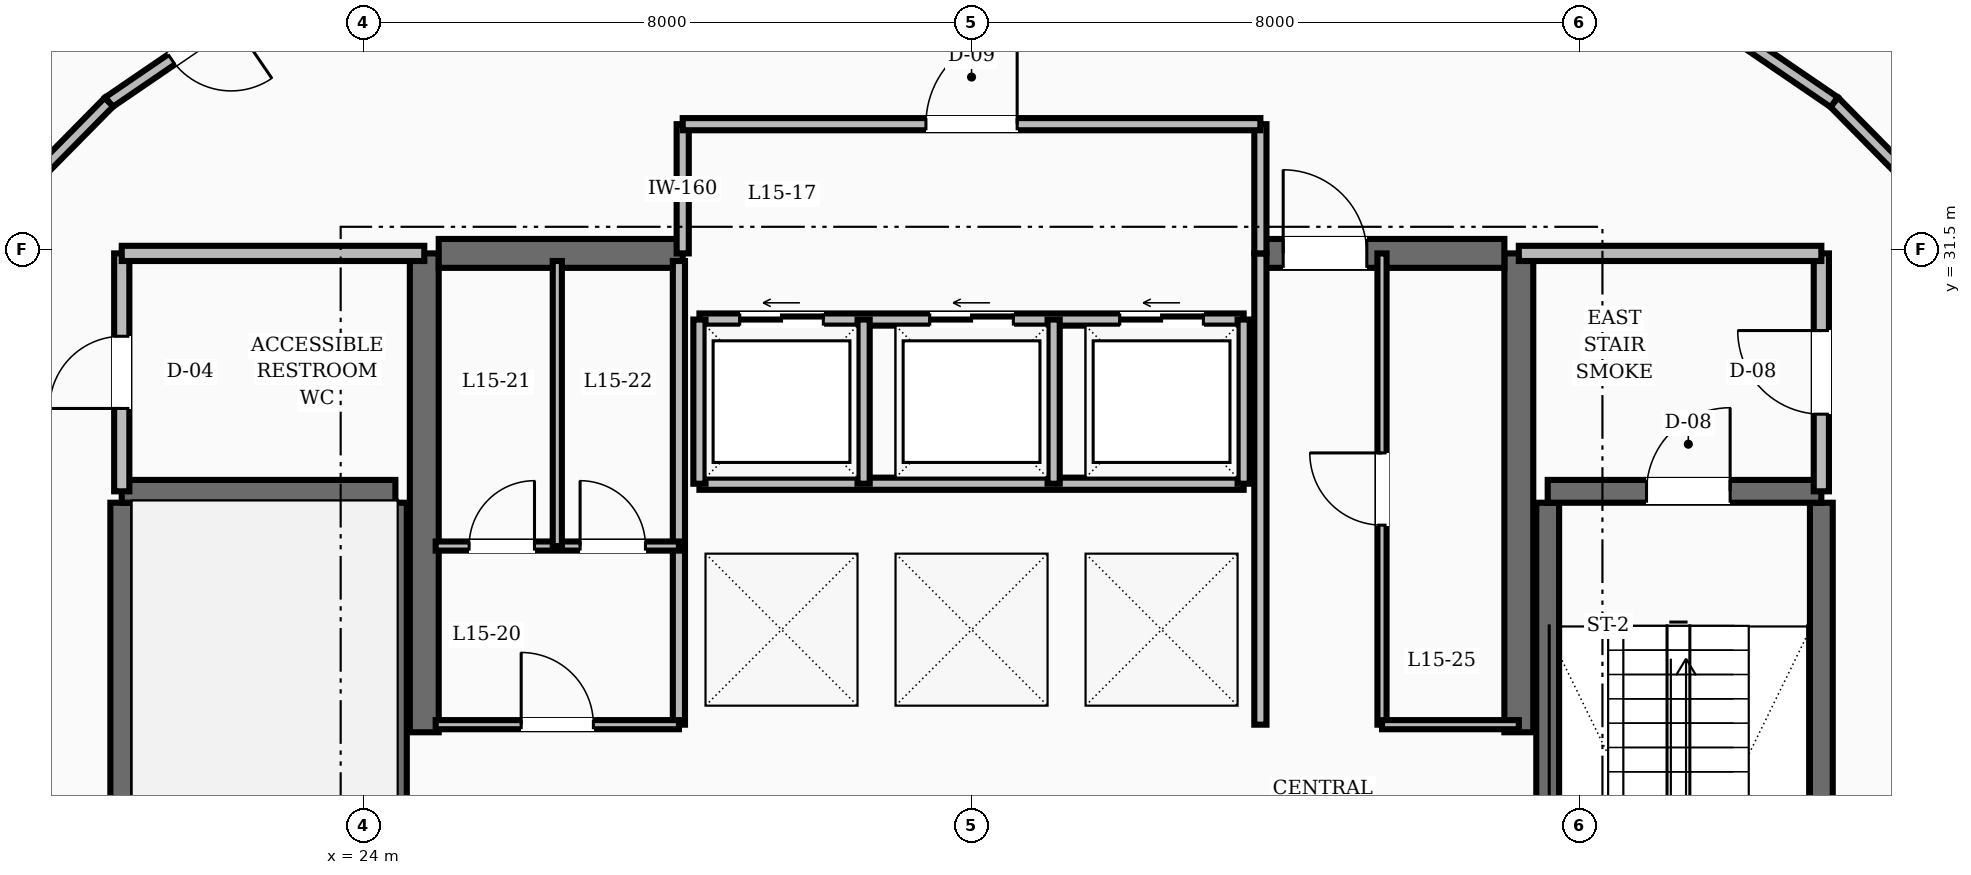
"""IFC4 building model, lengths in metres.
Left out: names, types, materials, properties, quantities, classifications, styles, units other than length and angle.
Written with IfcOpenShell. Run it as: python <this file> out.ifc"""

import sys

from ifc_helpers import new_model, si_unit, direction, frame, frame_2d, origin, place, context, subcontext, project, spatial, rectangle, extrude, element, fill, save


model = new_model("IFC4")
c1 = context("Model", 3, precision=1e-05, world=origin(), true_north=direction((0.0, 1.0)))
c2 = subcontext(c1, "Body", "Model", "MODEL_VIEW")
j1 = project(units=[si_unit("LENGTHUNIT", "METRE"), si_unit("PLANEANGLEUNIT", "RADIAN")], contexts=[c1])
p1 = place(None, origin())
s1 = spatial("IfcSite", under=j1, at=p1, CompositionType="ELEMENT")
p2 = place(p1, origin())
s2 = spatial("IfcBuilding", under=s1, at=p2, CompositionType="ELEMENT")
p3 = place(p2, frame((0.0, 0.0, 62.8)))
s3 = spatial("IfcBuildingStorey", under=s2, at=p3, CompositionType="ELEMENT", Elevation=62.8)
for number, where, z_axis, x_axis in (
    (1, (24.8, 25.15, 0.0), (0.0, 0.0, 1.0), (0.0, 1.0, 0.0)),
    (2, (39.2, 25.15, 0.0), (0.0, 0.0, 1.0), (0.0, 1.0, 0.0)),
):
    element("IfcWall", number, at=place(p3, frame(where, z_axis=z_axis, x_axis=x_axis)), inside=s3, PredefinedType="SHEAR", context=c2, shape_type="SweptSolid", body=[
        extrude(rectangle(XDim=6.3, YDim=0.38, at=frame_2d((3.15, 0.0))), origin(), (0.0, 0.0, 1.0), 3.6),
    ])
p4 = place(p3, frame((24.99, 31.45, 0.0), z_axis=(0.0, 0.0, 1.0), x_axis=(1.0, 0.0, 0.0)))
e3 = element("IfcWall", 3, at=p4, inside=s3, PredefinedType="SHEAR", context=c2, shape_type="SweptSolid", body=[
    extrude(rectangle(XDim=3.21, YDim=0.38, at=frame_2d((1.605, 0.0))), origin(), (0.0, 0.0, 1.0), 3.6),
])
p5 = place(p3, frame((35.8, 31.45, 0.0), z_axis=(0.0, 0.0, 1.0), x_axis=(1.0, 0.0, 0.0)))
e4 = element("IfcWall", 4, at=p5, inside=s3, PredefinedType="SHEAR", context=c2, shape_type="SweptSolid", body=[
    extrude(rectangle(XDim=3.21, YDim=0.38, at=frame_2d((1.605, 0.0))), origin(), (0.0, 0.0, 1.0), 3.6),
])
p6 = place(p5, frame((0.3, 0.0, 0.0)))
e5 = element("IfcOpeningElement", 5, at=p6, cuts=e4, PredefinedType="OPENING", context=c2, shape_type="SweptSolid", body=[
    extrude(rectangle(XDim=1.1, YDim=2.1, at=frame_2d((0.55, 1.05))), frame((0.0, 0.2, 0.0), z_axis=(0.0, -1.0, 0.0), x_axis=(1.0, 0.0, 0.0)), (0.0, 0.0, 1.0), 0.4),
])
for number, where, z_axis, x_axis in (
    (6, (20.82, 19.43, 0.0), (0.0, 0.0, 1.0), (0.0, 1.0, 0.0)),
    (7, (24.42, 19.43, 0.0), (0.0, 0.0, 1.0), (0.0, 1.0, 0.0)),
):
    element("IfcWall", number, at=place(p3, frame(where, z_axis=z_axis, x_axis=x_axis)), inside=s3, PredefinedType="SHEAR", context=c2, shape_type="SweptSolid", body=[
        extrude(rectangle(XDim=8.74, YDim=0.3, at=frame_2d((4.37, 0.0))), origin(), (0.0, 0.0, 1.0), 3.6),
    ])
p7 = place(p3, frame((20.82, 28.32, 0.0), z_axis=(0.0, 0.0, 1.0), x_axis=(1.0, 0.0, 0.0)))
e8 = element("IfcWall", 8, at=p7, inside=s3, PredefinedType="SHEAR", context=c2, shape_type="SweptSolid", body=[
    extrude(rectangle(XDim=3.6, YDim=0.3, at=frame_2d((1.8, 0.0))), origin(), (0.0, 0.0, 1.0), 3.6),
])
for number, where, z_axis, x_axis in (
    (9, (43.18, 19.43, 0.0), (0.0, 0.0, 1.0), (0.0, 1.0, 0.0)),
    (10, (39.58, 19.43, 0.0), (0.0, 0.0, 1.0), (0.0, 1.0, 0.0)),
):
    element("IfcWall", number, at=place(p3, frame(where, z_axis=z_axis, x_axis=x_axis)), inside=s3, PredefinedType="SHEAR", context=c2, shape_type="SweptSolid", body=[
        extrude(rectangle(XDim=8.74, YDim=0.3, at=frame_2d((4.37, 0.0))), origin(), (0.0, 0.0, 1.0), 3.6),
    ])
p8 = place(p3, frame((39.58, 28.32, 0.0), z_axis=(0.0, 0.0, 1.0), x_axis=(1.0, 0.0, 0.0)))
e11 = element("IfcWall", 11, at=p8, inside=s3, PredefinedType="SHEAR", context=c2, shape_type="SweptSolid", body=[
    extrude(rectangle(XDim=3.6, YDim=0.3, at=frame_2d((1.8, 0.0))), origin(), (0.0, 0.0, 1.0), 3.6),
])
p9 = place(p8, frame((1.3, 0.0, 0.0)))
e12 = element("IfcOpeningElement", 12, at=p9, cuts=e11, PredefinedType="OPENING", context=c2, shape_type="SweptSolid", body=[
    extrude(rectangle(XDim=1.1, YDim=2.1, at=frame_2d((0.55, 1.05))), frame((0.0, 0.16, 0.0), z_axis=(0.0, -1.0, 0.0), x_axis=(1.0, 0.0, 0.0)), (0.0, 0.0, 1.0), 0.32),
])
p10 = place(p3, frame((43.18, 28.32, 0.0), z_axis=(0.0, 0.0, 1.0), x_axis=(0.0, 1.0, 0.0)))
e13 = element("IfcWall", 13, at=p10, inside=s3, PredefinedType="SOLIDWALL", context=c2, shape_type="SweptSolid", body=[
    extrude(rectangle(XDim=3.13, YDim=0.2, at=frame_2d((1.565, 0.0))), origin(), (0.0, 0.0, 1.0), 2.71),
])
p11 = place(p10, frame((1.015, 0.0, 0.0)))
e14 = element("IfcOpeningElement", 14, at=p11, cuts=e13, PredefinedType="OPENING", context=c2, shape_type="SweptSolid", body=[
    extrude(rectangle(XDim=1.1, YDim=2.1, at=frame_2d((0.55, 1.05))), frame((0.0, 0.11, 0.0), z_axis=(0.0, -1.0, 0.0), x_axis=(1.0, 0.0, 0.0)), (0.0, 0.0, 1.0), 0.22),
])
p12 = place(p3, frame((39.2, 31.45, 0.0), z_axis=(0.0, 0.0, 1.0), x_axis=(1.0, 0.0, 0.0)))
e15 = element("IfcWall", 15, at=p12, inside=s3, PredefinedType="SOLIDWALL", context=c2, shape_type="SweptSolid", body=[
    extrude(rectangle(XDim=3.98, YDim=0.2, at=frame_2d((1.99, 0.0))), origin(), (0.0, 0.0, 1.0), 2.71),
])
p13 = place(p3, frame((20.82, 28.32, 0.0), z_axis=(0.0, 0.0, 1.0), x_axis=(0.0, 1.0, 0.0)))
e16 = element("IfcWall", 16, at=p13, inside=s3, PredefinedType="SOLIDWALL", context=c2, shape_type="SweptSolid", body=[
    extrude(rectangle(XDim=3.13, YDim=0.2, at=frame_2d((1.565, 0.0))), origin(), (0.0, 0.0, 1.0), 2.71),
])
p14 = place(p13, frame((1.09, 0.0, 0.0)))
e17 = element("IfcOpeningElement", 17, at=p14, cuts=e16, PredefinedType="OPENING", context=c2, shape_type="SweptSolid", body=[
    extrude(rectangle(XDim=0.95, YDim=2.1, at=frame_2d((0.475, 1.05))), frame((0.0, 0.11, 0.0), z_axis=(0.0, -1.0, 0.0), x_axis=(1.0, 0.0, 0.0)), (0.0, 0.0, 1.0), 0.22),
])
p15 = place(p3, frame((20.82, 31.45, 0.0), z_axis=(0.0, 0.0, 1.0), x_axis=(1.0, 0.0, 0.0)))
e18 = element("IfcWall", 18, at=p15, inside=s3, PredefinedType="SOLIDWALL", context=c2, shape_type="SweptSolid", body=[
    extrude(rectangle(XDim=3.98, YDim=0.2, at=frame_2d((1.99, 0.0))), origin(), (0.0, 0.0, 1.0), 2.71),
])
p16 = place(p3, frame((35.8, 25.25, 0.0), z_axis=(0.0, 0.0, 1.0), x_axis=(0.0, 1.0, 0.0)))
e19 = element("IfcWall", 19, at=p16, inside=s3, PredefinedType="SOLIDWALL", context=c2, shape_type="SweptSolid", body=[
    extrude(rectangle(XDim=6.2, YDim=0.16, at=frame_2d((3.1, 0.0))), origin(), (0.0, 0.0, 1.0), 2.71),
])
p17 = place(p3, frame((28.42, 30.58, 0.0), z_axis=(0.0, 0.0, 1.0), x_axis=(1.0, 0.0, 0.0)))
e20 = element("IfcWall", 20, at=p17, inside=s3, PredefinedType="SOLIDWALL", context=c2, shape_type="SweptSolid", body=[
    extrude(rectangle(XDim=7.16, YDim=0.16, at=frame_2d((3.58, 0.0))), origin(), (0.0, 0.0, 1.0), 2.71),
])
p18 = place(p17, frame((0.53, 0.0, 0.0)))
e21 = element("IfcOpeningElement", 21, at=p18, cuts=e20, PredefinedType="OPENING", context=c2, shape_type="SweptSolid", body=[
    extrude(rectangle(XDim=1.1, YDim=2.15, at=frame_2d((0.55, 1.075))), frame((0.0, 0.09, 0.0), z_axis=(0.0, -1.0, 0.0), x_axis=(1.0, 0.0, 0.0)), (0.0, 0.0, 1.0), 0.18),
])
p19 = place(p17, frame((3.03, 0.0, 0.0)))
e22 = element("IfcOpeningElement", 22, at=p19, cuts=e20, PredefinedType="OPENING", context=c2, shape_type="SweptSolid", body=[
    extrude(rectangle(XDim=1.1, YDim=2.15, at=frame_2d((0.55, 1.075))), frame((0.0, 0.09, 0.0), z_axis=(0.0, -1.0, 0.0), x_axis=(1.0, 0.0, 0.0)), (0.0, 0.0, 1.0), 0.18),
])
p20 = place(p17, frame((5.53, 0.0, 0.0)))
e23 = element("IfcOpeningElement", 23, at=p20, cuts=e20, PredefinedType="OPENING", context=c2, shape_type="SweptSolid", body=[
    extrude(rectangle(XDim=1.1, YDim=2.15, at=frame_2d((0.55, 1.075))), frame((0.0, 0.09, 0.0), z_axis=(0.0, -1.0, 0.0), x_axis=(1.0, 0.0, 0.0)), (0.0, 0.0, 1.0), 0.18),
])
p21 = place(p3, frame((28.42, 28.42, 0.0), z_axis=(0.0, 0.0, 1.0), x_axis=(1.0, 0.0, 0.0)))
e24 = element("IfcWall", 24, at=p21, inside=s3, PredefinedType="SOLIDWALL", context=c2, shape_type="SweptSolid", body=[
    extrude(rectangle(XDim=7.16, YDim=0.16, at=frame_2d((3.58, 0.0))), origin(), (0.0, 0.0, 1.0), 2.71),
])
for number, where, z_axis, x_axis in (
    (25, (28.42, 28.42, 0.0), (0.0, 0.0, 1.0), (0.0, 1.0, 0.0)),
    (26, (30.58, 28.42, 0.0), (0.0, 0.0, 1.0), (0.0, 1.0, 0.0)),
    (27, (33.08, 28.42, 0.0), (0.0, 0.0, 1.0), (0.0, 1.0, 0.0)),
    (28, (35.58, 28.42, 0.0), (0.0, 0.0, 1.0), (0.0, 1.0, 0.0)),
):
    element("IfcWall", number, at=place(p3, frame(where, z_axis=z_axis, x_axis=x_axis)), inside=s3, PredefinedType="SOLIDWALL", context=c2, shape_type="SweptSolid", body=[
        extrude(rectangle(XDim=2.16, YDim=0.16, at=frame_2d((1.08, 0.0))), origin(), (0.0, 0.0, 1.0), 2.71),
    ])
for number, where, z_axis, x_axis in (
    (29, (28.2, 31.45, 0.0), (0.0, 0.0, 1.0), (0.0, 1.0, 0.0)),
    (30, (35.8, 31.45, 0.0), (0.0, 0.0, 1.0), (0.0, 1.0, 0.0)),
):
    element("IfcWall", number, at=place(p3, frame(where, z_axis=z_axis, x_axis=x_axis)), inside=s3, PredefinedType="SOLIDWALL", context=c2, shape_type="SweptSolid", body=[
        extrude(rectangle(XDim=1.7, YDim=0.16, at=frame_2d((0.85, 0.0))), origin(), (0.0, 0.0, 1.0), 2.71),
    ])
p22 = place(p3, frame((28.2, 33.15, 0.0), z_axis=(0.0, 0.0, 1.0), x_axis=(1.0, 0.0, 0.0)))
e31 = element("IfcWall", 31, at=p22, inside=s3, PredefinedType="SOLIDWALL", context=c2, shape_type="SweptSolid", body=[
    extrude(rectangle(XDim=7.6, YDim=0.16, at=frame_2d((3.8, 0.0))), origin(), (0.0, 0.0, 1.0), 2.71),
])
p23 = place(p22, frame((3.2, 0.0, 0.0)))
e32 = element("IfcOpeningElement", 32, at=p23, cuts=e31, PredefinedType="OPENING", context=c2, shape_type="SweptSolid", body=[
    extrude(rectangle(XDim=1.2, YDim=2.1, at=frame_2d((0.6, 1.05))), frame((0.0, 0.09, 0.0), z_axis=(0.0, -1.0, 0.0), x_axis=(1.0, 0.0, 0.0)), (0.0, 0.0, 1.0), 0.18),
])
p24 = place(p3, frame((28.15, 25.25, 0.0), z_axis=(0.0, 0.0, 1.0), x_axis=(0.0, 1.0, 0.0)))
e33 = element("IfcWall", 33, at=p24, inside=s3, PredefinedType="SOLIDWALL", context=c2, shape_type="SweptSolid", body=[
    extrude(rectangle(XDim=6.1, YDim=0.16, at=frame_2d((3.05, 0.0))), origin(), (0.0, 0.0, 1.0), 2.71),
])
p25 = place(p3, frame((24.95, 25.25, 0.0), z_axis=(0.0, 0.0, 1.0), x_axis=(1.0, 0.0, 0.0)))
e34 = element("IfcWall", 34, at=p25, inside=s3, PredefinedType="PARTITIONING", context=c2, shape_type="SweptSolid", body=[
    extrude(rectangle(XDim=3.2, YDim=0.12, at=frame_2d((1.6, 0.0))), origin(), (0.0, 0.0, 1.0), 2.71),
])
p26 = place(p25, frame((1.125, 0.0, 0.0)))
e35 = element("IfcOpeningElement", 35, at=p26, cuts=e34, PredefinedType="OPENING", context=c2, shape_type="SweptSolid", body=[
    extrude(rectangle(XDim=0.95, YDim=2.1, at=frame_2d((0.475, 1.05))), frame((0.0, 0.07, 0.0), z_axis=(0.0, -1.0, 0.0), x_axis=(1.0, 0.0, 0.0)), (0.0, 0.0, 1.0), 0.14),
])
p27 = place(p3, frame((37.4, 25.25, 0.0), z_axis=(0.0, 0.0, 1.0), x_axis=(0.0, 1.0, 0.0)))
e36 = element("IfcWall", 36, at=p27, inside=s3, PredefinedType="PARTITIONING", context=c2, shape_type="SweptSolid", body=[
    extrude(rectangle(XDim=6.2, YDim=0.12, at=frame_2d((3.1, 0.0))), origin(), (0.0, 0.0, 1.0), 2.71),
])
p28 = place(p27, frame((2.625, 0.0, 0.0)))
e37 = element("IfcOpeningElement", 37, at=p28, cuts=e36, PredefinedType="OPENING", context=c2, shape_type="SweptSolid", body=[
    extrude(rectangle(XDim=0.95, YDim=2.1, at=frame_2d((0.475, 1.05))), frame((0.0, 0.07, 0.0), z_axis=(0.0, -1.0, 0.0), x_axis=(1.0, 0.0, 0.0)), (0.0, 0.0, 1.0), 0.14),
])
p29 = place(p3, frame((37.4, 25.25, 0.0), z_axis=(0.0, 0.0, 1.0), x_axis=(1.0, 0.0, 0.0)))
e38 = element("IfcWall", 38, at=p29, inside=s3, PredefinedType="PARTITIONING", context=c2, shape_type="SweptSolid", body=[
    extrude(rectangle(XDim=1.8, YDim=0.12, at=frame_2d((0.9, 0.0))), origin(), (0.0, 0.0, 1.0), 2.71),
])
p30 = place(p3, frame((24.95, 27.6, 0.0), z_axis=(0.0, 0.0, 1.0), x_axis=(1.0, 0.0, 0.0)))
e39 = element("IfcWall", 39, at=p30, inside=s3, PredefinedType="PARTITIONING", context=c2, shape_type="SweptSolid", body=[
    extrude(rectangle(XDim=3.2, YDim=0.12, at=frame_2d((1.6, 0.0))), origin(), (0.0, 0.0, 1.0), 2.71),
])
p31 = place(p30, frame((0.44, 0.0, 0.0)))
e40 = element("IfcOpeningElement", 40, at=p31, cuts=e39, PredefinedType="OPENING", context=c2, shape_type="SweptSolid", body=[
    extrude(rectangle(XDim=0.86, YDim=2.1, at=frame_2d((0.43, 1.05))), frame((0.0, 0.07, 0.0), z_axis=(0.0, -1.0, 0.0), x_axis=(1.0, 0.0, 0.0)), (0.0, 0.0, 1.0), 0.14),
])
p32 = place(p30, frame((1.9, 0.0, 0.0)))
e41 = element("IfcOpeningElement", 41, at=p32, cuts=e39, PredefinedType="OPENING", context=c2, shape_type="SweptSolid", body=[
    extrude(rectangle(XDim=0.86, YDim=2.1, at=frame_2d((0.43, 1.05))), frame((0.0, 0.07, 0.0), z_axis=(0.0, -1.0, 0.0), x_axis=(1.0, 0.0, 0.0)), (0.0, 0.0, 1.0), 0.14),
])
p33 = place(p3, frame((26.55, 27.6, 0.0), z_axis=(0.0, 0.0, 1.0), x_axis=(0.0, 1.0, 0.0)))
e42 = element("IfcWall", 42, at=p33, inside=s3, PredefinedType="PARTITIONING", context=c2, shape_type="SweptSolid", body=[
    extrude(rectangle(XDim=3.75, YDim=0.12, at=frame_2d((1.875, 0.0))), origin(), (0.0, 0.0, 1.0), 2.71),
])
p34 = place(p3, frame((45.345, 31.417, 0.0), z_axis=(0.0, 0.0, 1.0), x_axis=(-0.702366174226, 0.711815816981, 0.0)))
e43 = element("IfcWall", 43, at=p34, inside=s3, PredefinedType="SOLIDWALL", context=c2, shape_type="SweptSolid", body=[
    extrude(rectangle(XDim=2.842, YDim=0.16, at=frame_2d((1.421, 0.0))), origin(), (0.0, 0.0, 1.0), 2.71),
])
p35 = place(p3, frame((43.349, 33.44, 0.0), z_axis=(0.0, 0.0, 1.0), x_axis=(-0.825929039072, 0.563774088104, 0.0)))
e44 = element("IfcWall", 44, at=p35, inside=s3, PredefinedType="SOLIDWALL", context=c2, shape_type="SweptSolid", body=[
    extrude(rectangle(XDim=2.945, YDim=0.16, at=frame_2d((1.472, 0.0))), origin(), (0.0, 0.0, 1.0), 2.71),
])
p36 = place(p3, frame((23.083, 35.1, 0.0), z_axis=(0.0, 0.0, 1.0), x_axis=(-0.825929039072, -0.563774088104, 0.0)))
e45 = element("IfcWall", 45, at=p36, inside=s3, PredefinedType="SOLIDWALL", context=c2, shape_type="SweptSolid", body=[
    extrude(rectangle(XDim=2.945, YDim=0.16, at=frame_2d((1.472, 0.0))), origin(), (0.0, 0.0, 1.0), 2.71),
])
p37 = place(p36, frame((0.997, 0.0, 0.0)))
e46 = element("IfcOpeningElement", 46, at=p37, cuts=e45, PredefinedType="OPENING", context=c2, shape_type="SweptSolid", body=[
    extrude(rectangle(XDim=0.95, YDim=2.1, at=frame_2d((0.475, 1.05))), frame((0.0, 0.09, 0.0), z_axis=(0.0, -1.0, 0.0), x_axis=(1.0, 0.0, 0.0)), (0.0, 0.0, 1.0), 0.18),
])
p38 = place(p3, frame((20.651, 33.44, 0.0), z_axis=(0.0, 0.0, 1.0), x_axis=(-0.702366174226, -0.711815816981, 0.0)))
e47 = element("IfcWall", 47, at=p38, inside=s3, PredefinedType="SOLIDWALL", context=c2, shape_type="SweptSolid", body=[
    extrude(rectangle(XDim=2.842, YDim=0.16, at=frame_2d((1.421, 0.0))), origin(), (0.0, 0.0, 1.0), 2.71),
])
p39 = place(p9, origin())
e48 = element("IfcDoor", 48, at=p39, inside=s3, OperationType="SINGLE_SWING_RIGHT", PredefinedType="DOOR", context=c2, shape_type="SweptSolid", body=[
    extrude(rectangle(XDim=1.1, YDim=2.1, at=frame_2d((0.55, 1.05))), frame((0.0, 0.025, 0.0), z_axis=(0.0, -1.0, 0.0), x_axis=(1.0, 0.0, 0.0)), (0.0, 0.0, 1.0), 0.05),
])
fill(e12, e48)
p40 = place(p11, origin())
e49 = element("IfcDoor", 49, at=p40, inside=s3, OperationType="SINGLE_SWING_RIGHT", PredefinedType="DOOR", context=c2, shape_type="SweptSolid", body=[
    extrude(rectangle(XDim=1.1, YDim=2.1, at=frame_2d((0.55, 1.05))), frame((0.0, 0.025, 0.0), z_axis=(0.0, -1.0, 0.0), x_axis=(1.0, 0.0, 0.0)), (0.0, 0.0, 1.0), 0.05),
])
fill(e14, e49)
p41 = place(p14, origin())
e50 = element("IfcDoor", 50, at=p41, inside=s3, OperationType="SINGLE_SWING_LEFT", PredefinedType="DOOR", context=c2, shape_type="SweptSolid", body=[
    extrude(rectangle(XDim=0.95, YDim=2.1, at=frame_2d((0.475, 1.05))), frame((0.0, 0.025, 0.0), z_axis=(0.0, -1.0, 0.0), x_axis=(1.0, 0.0, 0.0)), (0.0, 0.0, 1.0), 0.05),
])
fill(e17, e50)
p42 = place(p6, origin())
e51 = element("IfcDoor", 51, at=p42, inside=s3, OperationType="SINGLE_SWING_LEFT", PredefinedType="DOOR", context=c2, shape_type="SweptSolid", body=[
    extrude(rectangle(XDim=1.1, YDim=2.1, at=frame_2d((0.55, 1.05))), frame((0.0, 0.025, 0.0), z_axis=(0.0, -1.0, 0.0), x_axis=(1.0, 0.0, 0.0)), (0.0, 0.0, 1.0), 0.05),
])
fill(e5, e51)
p43 = place(p18, origin())
e52 = element("IfcDoor", 52, at=p43, inside=s3, OperationType="SLIDING_TO_LEFT", PredefinedType="DOOR", context=c2, shape_type="SweptSolid", body=[
    extrude(rectangle(XDim=1.1, YDim=2.15, at=frame_2d((0.55, 1.075))), frame((0.0, 0.025, 0.0), z_axis=(0.0, -1.0, 0.0), x_axis=(1.0, 0.0, 0.0)), (0.0, 0.0, 1.0), 0.05),
])
fill(e21, e52)
p44 = place(p19, origin())
e53 = element("IfcDoor", 53, at=p44, inside=s3, OperationType="SLIDING_TO_LEFT", PredefinedType="DOOR", context=c2, shape_type="SweptSolid", body=[
    extrude(rectangle(XDim=1.1, YDim=2.15, at=frame_2d((0.55, 1.075))), frame((0.0, 0.025, 0.0), z_axis=(0.0, -1.0, 0.0), x_axis=(1.0, 0.0, 0.0)), (0.0, 0.0, 1.0), 0.05),
])
fill(e22, e53)
p45 = place(p20, origin())
e54 = element("IfcDoor", 54, at=p45, inside=s3, OperationType="SLIDING_TO_LEFT", PredefinedType="DOOR", context=c2, shape_type="SweptSolid", body=[
    extrude(rectangle(XDim=1.1, YDim=2.15, at=frame_2d((0.55, 1.075))), frame((0.0, 0.025, 0.0), z_axis=(0.0, -1.0, 0.0), x_axis=(1.0, 0.0, 0.0)), (0.0, 0.0, 1.0), 0.05),
])
fill(e23, e54)
p46 = place(p23, origin())
e55 = element("IfcDoor", 55, at=p46, inside=s3, OperationType="SINGLE_SWING_RIGHT", PredefinedType="DOOR", context=c2, shape_type="SweptSolid", body=[
    extrude(rectangle(XDim=1.2, YDim=2.1, at=frame_2d((0.6, 1.05))), frame((0.0, 0.025, 0.0), z_axis=(0.0, -1.0, 0.0), x_axis=(1.0, 0.0, 0.0)), (0.0, 0.0, 1.0), 0.05),
])
fill(e32, e55)
p47 = place(p26, origin())
e56 = element("IfcDoor", 56, at=p47, inside=s3, OperationType="SINGLE_SWING_LEFT", PredefinedType="DOOR", context=c2, shape_type="SweptSolid", body=[
    extrude(rectangle(XDim=0.95, YDim=2.1, at=frame_2d((0.475, 1.05))), frame((0.0, 0.025, 0.0), z_axis=(0.0, -1.0, 0.0), x_axis=(1.0, 0.0, 0.0)), (0.0, 0.0, 1.0), 0.05),
])
fill(e35, e56)
p48 = place(p31, origin())
e57 = element("IfcDoor", 57, at=p48, inside=s3, OperationType="SINGLE_SWING_RIGHT", PredefinedType="DOOR", context=c2, shape_type="SweptSolid", body=[
    extrude(rectangle(XDim=0.86, YDim=2.1, at=frame_2d((0.43, 1.05))), frame((0.0, 0.025, 0.0), z_axis=(0.0, -1.0, 0.0), x_axis=(1.0, 0.0, 0.0)), (0.0, 0.0, 1.0), 0.05),
])
fill(e40, e57)
p49 = place(p32, origin())
e58 = element("IfcDoor", 58, at=p49, inside=s3, OperationType="SINGLE_SWING_LEFT", PredefinedType="DOOR", context=c2, shape_type="SweptSolid", body=[
    extrude(rectangle(XDim=0.86, YDim=2.1, at=frame_2d((0.43, 1.05))), frame((0.0, 0.025, 0.0), z_axis=(0.0, -1.0, 0.0), x_axis=(1.0, 0.0, 0.0)), (0.0, 0.0, 1.0), 0.05),
])
fill(e41, e58)
p50 = place(p28, origin())
e59 = element("IfcDoor", 59, at=p50, inside=s3, OperationType="SINGLE_SWING_RIGHT", PredefinedType="DOOR", context=c2, shape_type="SweptSolid", body=[
    extrude(rectangle(XDim=0.95, YDim=2.1, at=frame_2d((0.475, 1.05))), frame((0.0, 0.025, 0.0), z_axis=(0.0, -1.0, 0.0), x_axis=(1.0, 0.0, 0.0)), (0.0, 0.0, 1.0), 0.05),
])
fill(e37, e59)
p51 = place(p37, origin())
e60 = element("IfcDoor", 60, at=p51, inside=s3, OperationType="SINGLE_SWING_LEFT", PredefinedType="DOOR", context=c2, shape_type="SweptSolid", body=[
    extrude(rectangle(XDim=0.95, YDim=2.1, at=frame_2d((0.475, 1.05))), frame((0.0, 0.025, 0.0), z_axis=(0.0, -1.0, 0.0), x_axis=(1.0, 0.0, 0.0)), (0.0, 0.0, 1.0), 0.05),
])
fill(e46, e60)
save(model, sys.argv[1])
